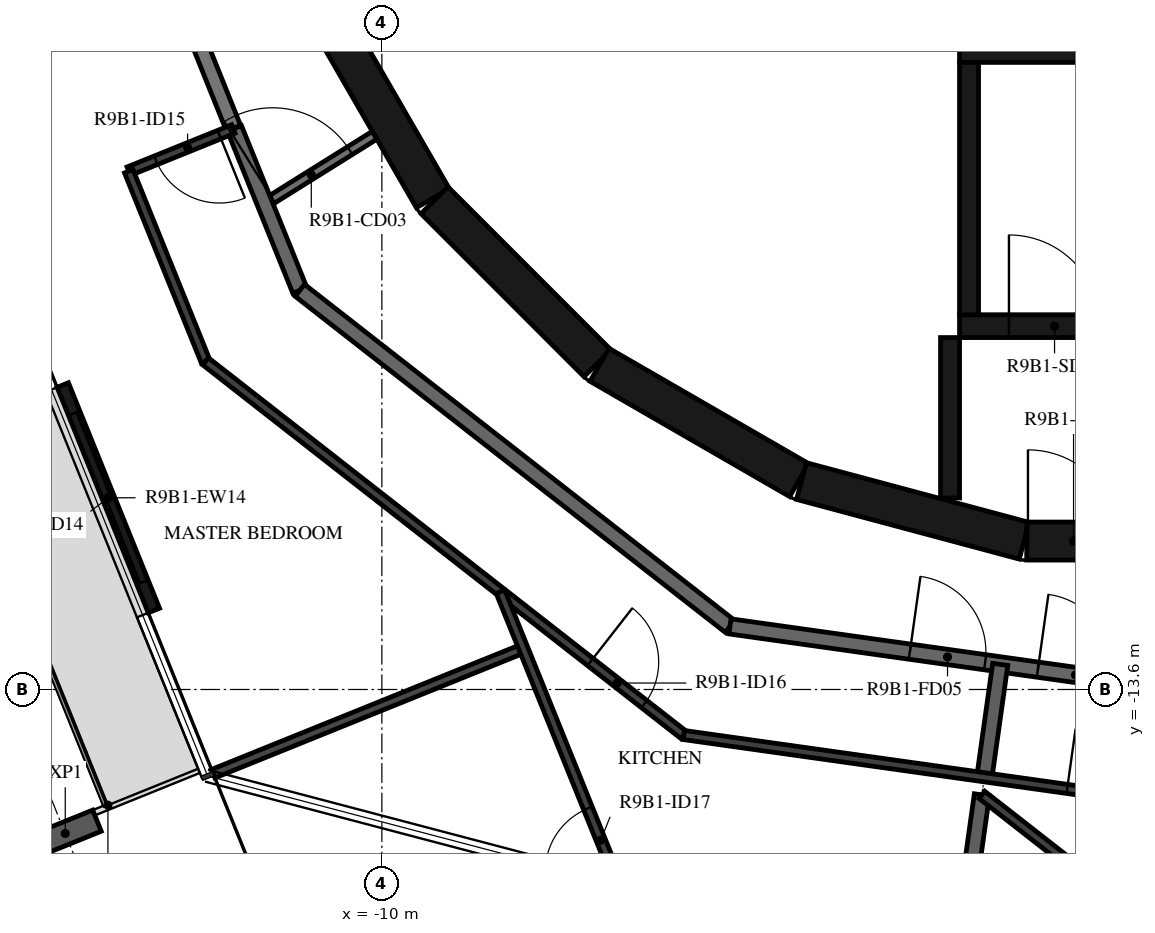
"""IFC4 building model, lengths in metres.
Left out: names, types, materials, properties, quantities, classifications, styles, units other than length and angle.
Written with IfcOpenShell. Run it as: python <this file> out.ifc"""

import sys

from ifc_helpers import new_model, si_unit, direction, frame, frame_2d, origin, origin_2d, place, context, subcontext, project, spatial, rectangle, i_section, extrude, element, fill, save


model = new_model("IFC4")
c1 = context("Model", 3, precision=1e-05, world=origin(), true_north=direction((0.0, 1.0)))
c2 = subcontext(c1, "Body", "Model", "MODEL_VIEW")
j1 = project(units=[si_unit("LENGTHUNIT", "METRE"), si_unit("PLANEANGLEUNIT", "RADIAN")], contexts=[c1])
p1 = place(None, origin())
s1 = spatial("IfcSite", under=j1, at=p1, CompositionType="ELEMENT")
p2 = place(p1, origin())
s2 = spatial("IfcBuilding", under=s1, at=p2, CompositionType="ELEMENT")
p3 = place(p2, frame((0.0, 0.0, 343.5)))
s3 = spatial("IfcBuildingStorey", under=s2, at=p3, CompositionType="ELEMENT", Elevation=343.5)
p4 = place(p3, frame((-14.166, -15.495, -0.38), z_axis=(0.0, 0.0, 1.0), x_axis=(-0.374606892434, 0.927183733755, 0.0)))
e1 = element("IfcColumn", 1, at=p4, inside=s3, PredefinedType="COLUMN", context=c2, shape_type="SweptSolid", body=[
    extrude(i_section(OverallWidth=0.3, OverallDepth=0.9, WebThickness=0.019, FlangeThickness=0.035, FilletRadius=0.03, at=origin_2d()), origin(), (0.0, 0.0, 1.0), 3.5),
])
p5 = place(p3, frame((-14.198, -9.594, 0.0), z_axis=(0.0, 0.0, 1.0), x_axis=(0.374624519695, -0.927176611678, 0.0)))
e2 = element("IfcWall", 2, at=p5, inside=s3, PredefinedType="STANDARD", context=c2, shape_type="SweptSolid", body=[
    extrude(rectangle(XDim=3.2, YDim=0.16, at=frame_2d((1.6, 0.0))), origin(), (0.0, 0.0, 1.0), 3.12),
])
p6 = place(p5, frame((0.4, 0.0, 0.0)))
e3 = element("IfcOpeningElement", 3, at=p6, cuts=e2, PredefinedType="OPENING", context=c2, shape_type="SweptSolid", body=[
    extrude(rectangle(XDim=2.4, YDim=2.4, at=frame_2d((1.2, 1.2))), frame((0.0, 0.09, 0.0), z_axis=(0.0, -1.0, 0.0), x_axis=(1.0, 0.0, 0.0)), (0.0, 0.0, 1.0), 0.18),
])
p7 = place(p3, frame((-10.845, -4.51, 0.0), z_axis=(0.0, 0.0, 1.0), x_axis=(0.500087131594, -0.865975092491, 0.0)))
e4 = element("IfcWall", 4, at=p7, inside=s3, PredefinedType="SHEAR", context=c2, shape_type="SweptSolid", body=[
    extrude(rectangle(XDim=3.033, YDim=0.5, at=frame_2d((1.516, 0.0))), origin(), (0.0, 0.0, 1.0), 3.12),
])
p8 = place(p3, frame((-9.308, -7.164, 0.0), z_axis=(0.0, 0.0, 1.0), x_axis=(0.707106781187, -0.707106781187, 0.0)))
e5 = element("IfcWall", 5, at=p8, inside=s3, PredefinedType="SHEAR", context=c2, shape_type="SweptSolid", body=[
    extrude(rectangle(XDim=3.032, YDim=0.5, at=frame_2d((1.516, 0.0))), origin(), (0.0, 0.0, 1.0), 3.12),
])
for number, where, z_axis, x_axis in (
    (6, (-7.137, -9.329, 0.0), (0.0, 0.0, 1.0), (0.866, -0.5, 0.0)),
    (7, (-4.479, -10.858, 0.0), (0.0, 0.0, 1.0), (0.966, -0.259, 0.0)),
):
    element("IfcWall", number, at=place(p3, frame(where, z_axis=z_axis, x_axis=x_axis)), inside=s3, PredefinedType="SHEAR", context=c2, shape_type="SweptSolid", body=[
        extrude(rectangle(XDim=3.033, YDim=0.5, at=frame_2d((1.516, 0.0))), origin(), (0.0, 0.0, 1.0), 3.12),
    ])
p9 = place(p3, frame((-1.516, -11.647, 0.0), z_axis=(0.0, 0.0, 1.0), x_axis=(1.0, 0.0, 0.0)))
e8 = element("IfcWall", 8, at=p9, inside=s3, PredefinedType="SHEAR", context=c2, shape_type="SweptSolid", body=[
    extrude(rectangle(XDim=3.033, YDim=0.5, at=frame_2d((1.516, 0.0))), origin(), (0.0, 0.0, 1.0), 3.12),
])
p10 = place(p9, frame((0.016, 0.0, 0.0)))
e9 = element("IfcOpeningElement", 9, at=p10, cuts=e8, PredefinedType="OPENING", context=c2, shape_type="SweptSolid", body=[
    extrude(rectangle(XDim=1.2, YDim=2.1, at=frame_2d((0.6, 1.05))), frame((0.0, 0.26, 0.0), z_axis=(0.0, -1.0, 0.0), x_axis=(1.0, 0.0, 0.0)), (0.0, 0.0, 1.0), 0.52),
])
p11 = place(p3, frame((-2.275, -8.67, 0.0), z_axis=(0.0, 0.0, 1.0), x_axis=(0.0, 1.0, 0.0)))
e10 = element("IfcWall", 10, at=p11, inside=s3, PredefinedType="SHEAR", context=c2, shape_type="SweptSolid", body=[
    extrude(rectangle(XDim=3.32, YDim=0.25, at=frame_2d((1.66, 0.0))), origin(), (0.0, 0.0, 1.0), 3.12),
])
p12 = place(p3, frame((-2.4, -5.2, 0.0), z_axis=(0.0, 0.0, 1.0), x_axis=(1.0, 0.0, 0.0)))
e11 = element("IfcWall", 11, at=p12, inside=s3, PredefinedType="SHEAR", context=c2, shape_type="SweptSolid", body=[
    extrude(rectangle(XDim=7.05, YDim=0.3, at=frame_2d((3.525, 0.0))), origin(), (0.0, 0.0, 1.0), 3.12),
])
p13 = place(p3, frame((-2.4, -8.82, 0.0), z_axis=(0.0, 0.0, 1.0), x_axis=(1.0, 0.0, 0.0)))
e12 = element("IfcWall", 12, at=p13, inside=s3, PredefinedType="SHEAR", context=c2, shape_type="SweptSolid", body=[
    extrude(rectangle(XDim=2.5, YDim=0.3, at=frame_2d((1.25, 0.0))), origin(), (0.0, 0.0, 1.0), 3.12),
])
p14 = place(p13, frame((0.65, 0.0, 0.0)))
e13 = element("IfcOpeningElement", 13, at=p14, cuts=e12, PredefinedType="OPENING", context=c2, shape_type="SweptSolid", body=[
    extrude(rectangle(XDim=1.2, YDim=2.1, at=frame_2d((0.6, 1.05))), frame((0.0, 0.16, 0.0), z_axis=(0.0, -1.0, 0.0), x_axis=(1.0, 0.0, 0.0)), (0.0, 0.0, 1.0), 0.32),
])
p15 = place(p3, frame((-2.525, -8.97, 0.0), z_axis=(0.0, 0.0, 1.0), x_axis=(0.0, -1.0, 0.0)))
e14 = element("IfcWall", 14, at=p15, inside=s3, PredefinedType="SHEAR", context=c2, shape_type="SweptSolid", body=[
    extrude(rectangle(XDim=2.11, YDim=0.25, at=frame_2d((1.055, 0.0))), origin(), (0.0, 0.0, 1.0), 3.12),
])
p16 = place(p3, frame((-11.539, -7.21, 0.0), z_axis=(0.0, 0.0, 1.0), x_axis=(0.848103039868, 0.529831325769, 0.0)))
e15 = element("IfcWall", 15, at=p16, inside=s3, PredefinedType="PARTITIONING", context=c2, shape_type="SweptSolid", body=[
    extrude(rectangle(XDim=1.702, YDim=0.12, at=frame_2d((0.851, 0.0))), origin(), (0.0, 0.0, 1.0), 3.12),
])
p17 = place(p16, frame((0.12, 0.0, 0.0)))
e16 = element("IfcOpeningElement", 16, at=p17, cuts=e15, PredefinedType="OPENING", context=c2, shape_type="SweptSolid", body=[
    extrude(rectangle(XDim=1.2, YDim=2.1, at=frame_2d((0.6, 1.05))), frame((0.0, 0.07, 0.0), z_axis=(0.0, -1.0, 0.0), x_axis=(1.0, 0.0, 0.0)), (0.0, 0.0, 1.0), 0.14),
])
p18 = place(p3, frame((-13.769, -1.691, 0.0), z_axis=(0.0, 0.0, 1.0), x_axis=(0.372720094028, -0.927943819155, 0.0)))
e17 = element("IfcWall", 17, at=p18, inside=s3, PredefinedType="STANDARD", context=c2, shape_type="SweptSolid", body=[
    extrude(rectangle(XDim=4.875, YDim=0.2, at=frame_2d((2.438, 0.0))), origin(), (0.0, 0.0, 1.0), 3.12),
])
p19 = place(p3, frame((-11.939, -6.22, 0.0), z_axis=(0.0, 0.0, 1.0), x_axis=(0.374651128394, -0.927165860024, 0.0)))
e18 = element("IfcWall", 18, at=p19, inside=s3, PredefinedType="STANDARD", context=c2, shape_type="SweptSolid", body=[
    extrude(rectangle(XDim=2.296, YDim=0.2, at=frame_2d((1.148, 0.0))), origin(), (0.0, 0.0, 1.0), 3.12),
])
p20 = place(p3, frame((-11.079, -8.349, 0.0), z_axis=(0.0, 0.0, 1.0), x_axis=(0.78800478687, -0.615669112324, 0.0)))
e19 = element("IfcWall", 19, at=p20, inside=s3, PredefinedType="STANDARD", context=c2, shape_type="SweptSolid", body=[
    extrude(rectangle(XDim=7.181, YDim=0.2, at=frame_2d((3.591, 0.0))), origin(), (0.0, 0.0, 1.0), 3.12),
])
p21 = place(p3, frame((-5.42, -12.77, 0.0), z_axis=(0.0, 0.0, 1.0), x_axis=(0.990270565508, -0.139155334385, 0.0)))
e20 = element("IfcWall", 20, at=p21, inside=s3, PredefinedType="STANDARD", context=c2, shape_type="SweptSolid", body=[
    extrude(rectangle(XDim=7.181, YDim=0.2, at=frame_2d((3.59, 0.0))), origin(), (0.0, 0.0, 1.0), 3.12),
])
p22 = place(p21, frame((2.39, 0.0, 0.0)))
e21 = element("IfcOpeningElement", 21, at=p22, cuts=e20, PredefinedType="OPENING", context=c2, shape_type="SweptSolid", body=[
    extrude(rectangle(XDim=1.0, YDim=2.1, at=frame_2d((0.5, 1.05))), frame((0.0, 0.11, 0.0), z_axis=(0.0, -1.0, 0.0), x_axis=(1.0, 0.0, 0.0)), (0.0, 0.0, 1.0), 0.22),
])
p23 = place(p21, frame((4.091, 0.0, 0.0)))
e22 = element("IfcOpeningElement", 22, at=p23, cuts=e20, PredefinedType="OPENING", context=c2, shape_type="SweptSolid", body=[
    extrude(rectangle(XDim=1.0, YDim=2.1, at=frame_2d((0.5, 1.05))), frame((0.0, 0.11, 0.0), z_axis=(0.0, -1.0, 0.0), x_axis=(1.0, 0.0, 0.0)), (0.0, 0.0, 1.0), 0.22),
])
p24 = place(p3, frame((-2.073, -14.755, 0.0), z_axis=(0.0, 0.0, 1.0), x_axis=(0.139005431033, 0.990291618738, 0.0)))
e23 = element("IfcWall", 23, at=p24, inside=s3, PredefinedType="STANDARD", context=c2, shape_type="SweptSolid", body=[
    extrude(rectangle(XDim=1.5, YDim=0.2, at=frame_2d((0.75, 0.0))), origin(), (0.0, 0.0, 1.0), 3.12),
])
p25 = place(p3, frame((-2.256, -16.055, 0.0), z_axis=(0.0, 0.0, 1.0), x_axis=(0.139109268657, 0.990277037689, 0.0)))
e24 = element("IfcWall", 24, at=p25, inside=s3, PredefinedType="STANDARD", context=c2, shape_type="SweptSolid", body=[
    extrude(rectangle(XDim=1.079, YDim=0.2, at=frame_2d((0.54, 0.0))), origin(), (0.0, 0.0, 1.0), 3.12),
])
p26 = place(p3, frame((-11.953, -6.225, 0.0), z_axis=(0.0, 0.0, 1.0), x_axis=(-0.927144096717, -0.374704982518, 0.0)))
e25 = element("IfcWall", 25, at=p26, inside=s3, PredefinedType="PARTITIONING", context=c2, shape_type="SweptSolid", body=[
    extrude(rectangle(XDim=1.485, YDim=0.12, at=frame_2d((0.742, 0.0))), origin(), (0.0, 0.0, 1.0), 3.12),
])
p27 = place(p26, frame((0.2, 0.0, 0.0)))
e26 = element("IfcOpeningElement", 26, at=p27, cuts=e25, PredefinedType="OPENING", context=c2, shape_type="SweptSolid", body=[
    extrude(rectangle(XDim=0.9, YDim=2.1, at=frame_2d((0.45, 1.05))), frame((0.0, 0.07, 0.0), z_axis=(0.0, -1.0, 0.0), x_axis=(1.0, 0.0, 0.0)), (0.0, 0.0, 1.0), 0.14),
])
p28 = place(p3, frame((-13.33, -6.782, 0.0), z_axis=(0.0, 0.0, 1.0), x_axis=(0.374602180132, -0.927185637637, 0.0)))
e27 = element("IfcWall", 27, at=p28, inside=s3, PredefinedType="PARTITIONING", context=c2, shape_type="SweptSolid", body=[
    extrude(rectangle(XDim=2.698, YDim=0.12, at=frame_2d((1.349, 0.0))), origin(), (0.0, 0.0, 1.0), 3.12),
])
p29 = place(p3, frame((-12.319, -9.283, 0.0), z_axis=(0.0, 0.0, 1.0), x_axis=(0.788000268464, -0.61567489546, 0.0)))
e28 = element("IfcWall", 28, at=p29, inside=s3, PredefinedType="PARTITIONING", context=c2, shape_type="SweptSolid", body=[
    extrude(rectangle(XDim=7.985, YDim=0.12, at=frame_2d((3.992, 0.0))), origin(), (0.0, 0.0, 1.0), 3.12),
])
p30 = place(p29, frame((6.423, 0.0, 0.0)))
e29 = element("IfcOpeningElement", 29, at=p30, cuts=e28, PredefinedType="OPENING", context=c2, shape_type="SweptSolid", body=[
    extrude(rectangle(XDim=0.9, YDim=2.1, at=frame_2d((0.45, 1.05))), frame((0.0, 0.07, 0.0), z_axis=(0.0, -1.0, 0.0), x_axis=(1.0, 0.0, 0.0)), (0.0, 0.0, 1.0), 0.14),
])
p31 = place(p3, frame((-6.027, -14.199, 0.0), z_axis=(0.0, 0.0, 1.0), x_axis=(0.990271617837, -0.139147845494, 0.0)))
e30 = element("IfcWall", 30, at=p31, inside=s3, PredefinedType="PARTITIONING", context=c2, shape_type="SweptSolid", body=[
    extrude(rectangle(XDim=7.308, YDim=0.12, at=frame_2d((3.654, 0.0))), origin(), (0.0, 0.0, 1.0), 3.12),
])
p32 = place(p31, frame((5.093, 0.0, 0.0)))
e31 = element("IfcOpeningElement", 31, at=p32, cuts=e30, PredefinedType="OPENING", context=c2, shape_type="SweptSolid", body=[
    extrude(rectangle(XDim=0.8, YDim=2.1, at=frame_2d((0.4, 1.05))), frame((0.0, 0.07, 0.0), z_axis=(0.0, -1.0, 0.0), x_axis=(1.0, 0.0, 0.0)), (0.0, 0.0, 1.0), 0.14),
])
p33 = place(p3, frame((-12.219, -14.708, 0.0), z_axis=(0.0, 0.0, 1.0), x_axis=(0.927189216671, 0.374593321469, 0.0)))
e32 = element("IfcWall", 32, at=p33, inside=s3, PredefinedType="PARTITIONING", context=c2, shape_type="SweptSolid", body=[
    extrude(rectangle(XDim=4.4, YDim=0.12, at=frame_2d((2.2, 0.0))), origin(), (0.0, 0.0, 1.0), 2.73),
])
p34 = place(p3, frame((-5.894, -18.616, 0.0), z_axis=(0.0, 0.0, 1.0), x_axis=(-0.374596683143, 0.927187858515, 0.0)))
e33 = element("IfcWall", 33, at=p34, inside=s3, PredefinedType="PARTITIONING", context=c2, shape_type="SweptSolid", body=[
    extrude(rectangle(XDim=6.796, YDim=0.12, at=frame_2d((3.398, 0.0))), origin(), (0.0, 0.0, 1.0), 3.12),
])
p35 = place(p34, frame((2.822, 0.0, 0.0)))
e34 = element("IfcOpeningElement", 34, at=p35, cuts=e33, PredefinedType="OPENING", context=c2, shape_type="SweptSolid", body=[
    extrude(rectangle(XDim=0.9, YDim=2.1, at=frame_2d((0.45, 1.05))), frame((0.0, 0.07, 0.0), z_axis=(0.0, -1.0, 0.0), x_axis=(1.0, 0.0, 0.0)), (0.0, 0.0, 1.0), 0.14),
])
p36 = place(p3, frame((2.363, -18.478, 0.0), z_axis=(0.0, 0.0, 1.0), x_axis=(-0.788010669333, 0.615661583191, 0.0)))
e35 = element("IfcWall", 35, at=p36, inside=s3, PredefinedType="PARTITIONING", context=c2, shape_type="SweptSolid", body=[
    extrude(rectangle(XDim=5.672, YDim=0.12, at=frame_2d((2.836, 0.0))), origin(), (0.0, 0.0, 1.0), 3.12),
])
p37 = place(p6, origin())
e36 = element("IfcDoor", 36, at=p37, inside=s3, OperationType="DOUBLE_DOOR_SLIDING", PredefinedType="DOOR", context=c2, shape_type="SweptSolid", body=[
    extrude(rectangle(XDim=2.4, YDim=2.4, at=frame_2d((1.2, 1.2))), frame((0.0, 0.025, 0.0), z_axis=(0.0, -1.0, 0.0), x_axis=(1.0, 0.0, 0.0)), (0.0, 0.0, 1.0), 0.05),
])
fill(e3, e36)
p38 = place(p14, origin())
e37 = element("IfcDoor", 37, at=p38, inside=s3, OperationType="SINGLE_SWING_LEFT", PredefinedType="DOOR", context=c2, shape_type="SweptSolid", body=[
    extrude(rectangle(XDim=1.2, YDim=2.1, at=frame_2d((0.6, 1.05))), frame((0.0, 0.025, 0.0), z_axis=(0.0, -1.0, 0.0), x_axis=(1.0, 0.0, 0.0)), (0.0, 0.0, 1.0), 0.05),
])
fill(e13, e37)
p39 = place(p10, origin())
e38 = element("IfcDoor", 38, at=p39, inside=s3, OperationType="SINGLE_SWING_RIGHT", PredefinedType="DOOR", context=c2, shape_type="SweptSolid", body=[
    extrude(rectangle(XDim=1.2, YDim=2.1, at=frame_2d((0.6, 1.05))), frame((0.0, 0.025, 0.0), z_axis=(0.0, -1.0, 0.0), x_axis=(1.0, 0.0, 0.0)), (0.0, 0.0, 1.0), 0.05),
])
fill(e9, e38)
p40 = place(p22, origin())
e39 = element("IfcDoor", 39, at=p40, inside=s3, OperationType="SINGLE_SWING_RIGHT", PredefinedType="DOOR", context=c2, shape_type="SweptSolid", body=[
    extrude(rectangle(XDim=1.0, YDim=2.1, at=frame_2d((0.5, 1.05))), frame((0.0, 0.025, 0.0), z_axis=(0.0, -1.0, 0.0), x_axis=(1.0, 0.0, 0.0)), (0.0, 0.0, 1.0), 0.05),
])
fill(e21, e39)
p41 = place(p27, origin())
e40 = element("IfcDoor", 40, at=p41, inside=s3, OperationType="SINGLE_SWING_LEFT", PredefinedType="DOOR", context=c2, shape_type="SweptSolid", body=[
    extrude(rectangle(XDim=0.9, YDim=2.1, at=frame_2d((0.45, 1.05))), frame((0.0, 0.025, 0.0), z_axis=(0.0, -1.0, 0.0), x_axis=(1.0, 0.0, 0.0)), (0.0, 0.0, 1.0), 0.05),
])
fill(e26, e40)
p42 = place(p30, origin())
e41 = element("IfcDoor", 41, at=p42, inside=s3, OperationType="SINGLE_SWING_RIGHT", PredefinedType="DOOR", context=c2, shape_type="SweptSolid", body=[
    extrude(rectangle(XDim=0.9, YDim=2.1, at=frame_2d((0.45, 1.05))), frame((0.0, 0.025, 0.0), z_axis=(0.0, -1.0, 0.0), x_axis=(1.0, 0.0, 0.0)), (0.0, 0.0, 1.0), 0.05),
])
fill(e29, e41)
p43 = place(p35, origin())
e42 = element("IfcDoor", 42, at=p43, inside=s3, OperationType="SINGLE_SWING_RIGHT", PredefinedType="DOOR", context=c2, shape_type="SweptSolid", body=[
    extrude(rectangle(XDim=0.9, YDim=2.1, at=frame_2d((0.45, 1.05))), frame((0.0, 0.025, 0.0), z_axis=(0.0, -1.0, 0.0), x_axis=(1.0, 0.0, 0.0)), (0.0, 0.0, 1.0), 0.05),
])
fill(e34, e42)
p44 = place(p23, origin())
e43 = element("IfcDoor", 43, at=p44, inside=s3, OperationType="SINGLE_SWING_RIGHT", PredefinedType="DOOR", context=c2, shape_type="SweptSolid", body=[
    extrude(rectangle(XDim=1.0, YDim=2.1, at=frame_2d((0.5, 1.05))), frame((0.0, 0.025, 0.0), z_axis=(0.0, -1.0, 0.0), x_axis=(1.0, 0.0, 0.0)), (0.0, 0.0, 1.0), 0.05),
])
fill(e22, e43)
p45 = place(p32, origin())
e44 = element("IfcDoor", 44, at=p45, inside=s3, OperationType="SINGLE_SWING_LEFT", PredefinedType="DOOR", context=c2, shape_type="SweptSolid", body=[
    extrude(rectangle(XDim=0.8, YDim=2.1, at=frame_2d((0.4, 1.05))), frame((0.0, 0.025, 0.0), z_axis=(0.0, -1.0, 0.0), x_axis=(1.0, 0.0, 0.0)), (0.0, 0.0, 1.0), 0.05),
])
fill(e31, e44)
p46 = place(p17, origin())
e45 = element("IfcDoor", 45, at=p46, inside=s3, OperationType="DOUBLE_DOOR_SINGLE_SWING", PredefinedType="DOOR", context=c2, shape_type="SweptSolid", body=[
    extrude(rectangle(XDim=1.2, YDim=2.1, at=frame_2d((0.6, 1.05))), frame((0.0, 0.025, 0.0), z_axis=(0.0, -1.0, 0.0), x_axis=(1.0, 0.0, 0.0)), (0.0, 0.0, 1.0), 0.05),
])
fill(e16, e45)
save(model, sys.argv[1])
